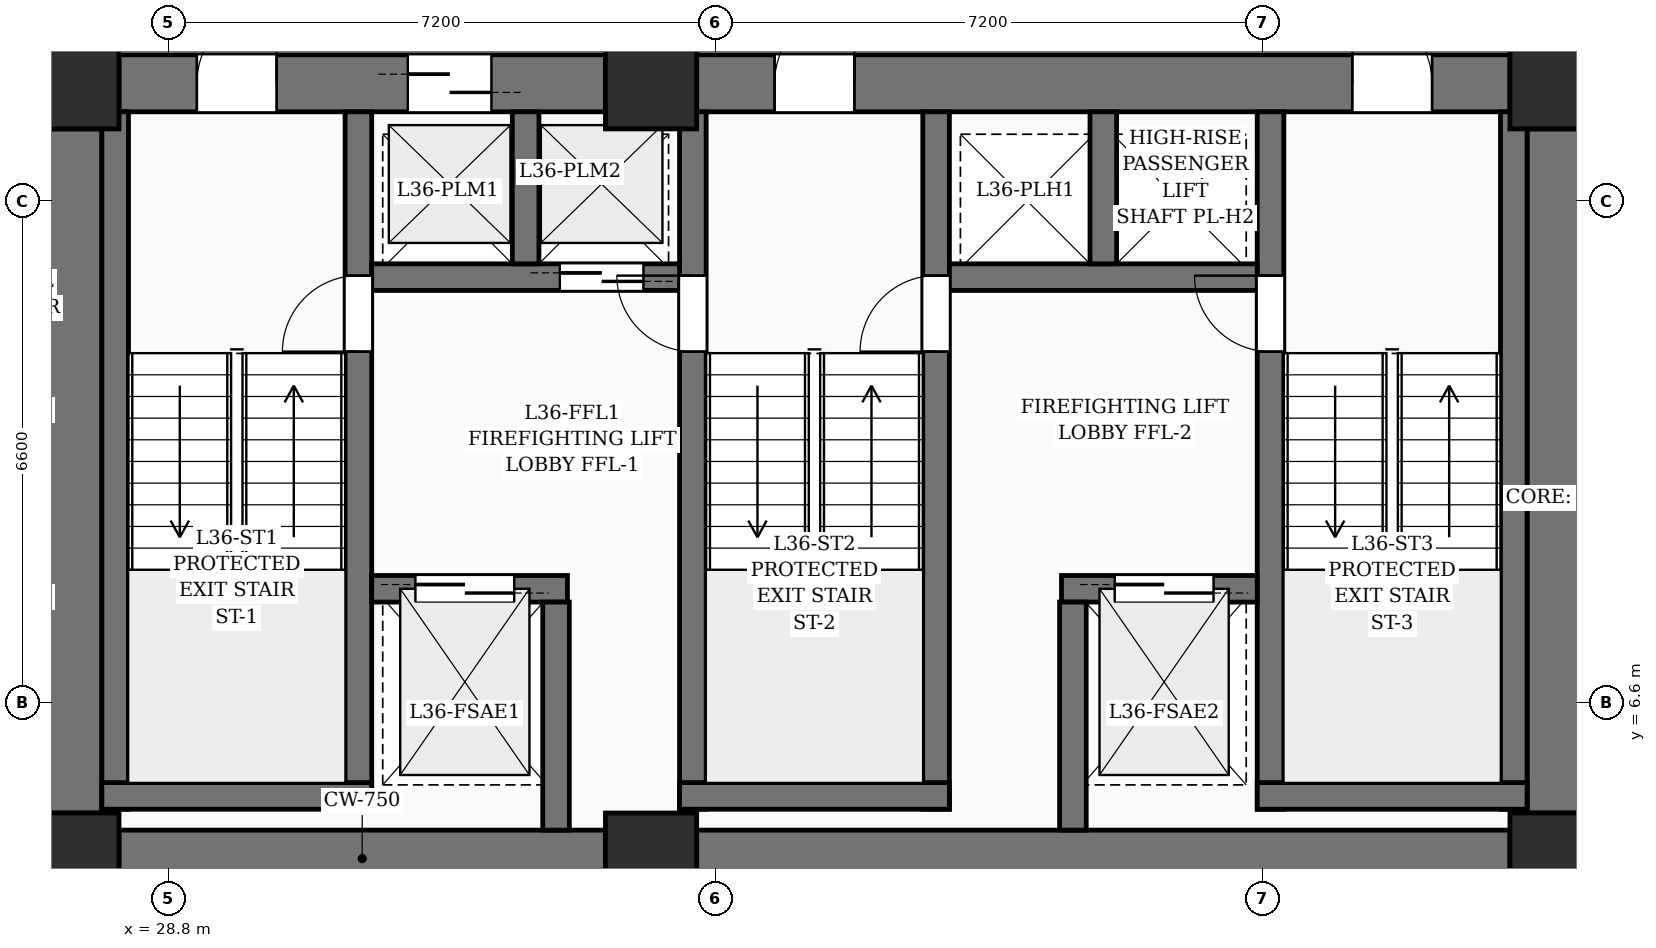
"""IFC4 building model, lengths in metres.
Left out: names, types, materials, properties, quantities, classifications, styles, units other than length and angle.
Written with IfcOpenShell. Run it as: python <this file> out.ifc"""

import sys

from ifc_helpers import new_model, si_unit, direction, frame, frame_2d, origin, origin_2d, place, context, subcontext, project, spatial, rectangle, extrude, element, fill, save


model = new_model("IFC4")
c1 = context("Model", 3, precision=1e-05, world=origin(), true_north=direction((0.0, 1.0)))
c2 = subcontext(c1, "Body", "Model", "MODEL_VIEW")
j1 = project(units=[si_unit("LENGTHUNIT", "METRE"), si_unit("PLANEANGLEUNIT", "RADIAN")], contexts=[c1])
p1 = place(None, origin())
s1 = spatial("IfcSite", under=j1, at=p1, CompositionType="ELEMENT")
p2 = place(p1, origin())
s2 = spatial("IfcBuilding", under=s1, at=p2, CompositionType="ELEMENT")
p3 = place(p2, frame((0.0, 0.0, 142.8)))
s3 = spatial("IfcBuildingStorey", under=s2, at=p3, CompositionType="ELEMENT", Elevation=142.8)
for number, where, z_axis, x_axis in (
    (1, (27.55, 4.55, 0.0), (0.0, 0.0, 1.0), (1.0, 0.0, 0.0)),
    (2, (35.15, 4.55, 0.0), (0.0, 0.0, 1.0), (1.0, 0.0, 0.0)),
    (3, (47.05, 4.55, 0.0), (0.0, 0.0, 1.0), (1.0, 0.0, 0.0)),
    (4, (27.55, 14.75, 0.0), (0.0, 0.0, 1.0), (1.0, 0.0, 0.0)),
    (5, (35.15, 14.75, 0.0), (0.0, 0.0, 1.0), (1.0, 0.0, 0.0)),
    (6, (47.05, 14.75, 0.0), (0.0, 0.0, 1.0), (1.0, 0.0, 0.0)),
):
    element("IfcColumn", number, at=place(p3, frame(where, z_axis=z_axis, x_axis=x_axis)), inside=s3, PredefinedType="COLUMN", context=c2, shape_type="SweptSolid", body=[
        extrude(rectangle(XDim=1.2, YDim=1.2, at=origin_2d()), origin(), (0.0, 0.0, 1.0), 3.6),
    ])
p4 = place(p3, frame((28.15, 4.55, 0.0), z_axis=(0.0, 0.0, 1.0), x_axis=(1.0, 0.0, 0.0)))
e7 = element("IfcWall", 7, at=p4, inside=s3, PredefinedType="SHEAR", context=c2, shape_type="SweptSolid", body=[
    extrude(rectangle(XDim=6.4, YDim=0.75, at=frame_2d((3.2, 0.0))), origin(), (0.0, 0.0, 1.0), 3.6),
])
p5 = place(p3, frame((35.75, 4.55, 0.0), z_axis=(0.0, 0.0, 1.0), x_axis=(1.0, 0.0, 0.0)))
e8 = element("IfcWall", 8, at=p5, inside=s3, PredefinedType="SHEAR", context=c2, shape_type="SweptSolid", body=[
    extrude(rectangle(XDim=10.7, YDim=0.75, at=frame_2d((5.35, 0.0))), origin(), (0.0, 0.0, 1.0), 3.6),
])
p6 = place(p3, frame((28.15, 14.75, 0.0), z_axis=(0.0, 0.0, 1.0), x_axis=(1.0, 0.0, 0.0)))
e9 = element("IfcWall", 9, at=p6, inside=s3, PredefinedType="SHEAR", context=c2, shape_type="SweptSolid", body=[
    extrude(rectangle(XDim=6.4, YDim=0.75, at=frame_2d((3.2, 0.0))), origin(), (0.0, 0.0, 1.0), 3.6),
])
p7 = place(p6, frame((1.025, 0.0, 0.0)))
e10 = element("IfcOpeningElement", 10, at=p7, cuts=e9, PredefinedType="OPENING", context=c2, shape_type="SweptSolid", body=[
    extrude(rectangle(XDim=1.05, YDim=2.15, at=frame_2d((0.525, 1.075))), frame((0.0, 0.385, 0.0), z_axis=(0.0, -1.0, 0.0), x_axis=(1.0, 0.0, 0.0)), (0.0, 0.0, 1.0), 0.77),
])
p8 = place(p6, frame((3.8, 0.0, 0.0)))
e11 = element("IfcOpeningElement", 11, at=p8, cuts=e9, PredefinedType="OPENING", context=c2, shape_type="SweptSolid", body=[
    extrude(rectangle(XDim=1.1, YDim=2.2, at=frame_2d((0.55, 1.1))), frame((0.0, 0.385, 0.0), z_axis=(0.0, -1.0, 0.0), x_axis=(1.0, 0.0, 0.0)), (0.0, 0.0, 1.0), 0.77),
])
p9 = place(p3, frame((35.75, 14.75, 0.0), z_axis=(0.0, 0.0, 1.0), x_axis=(1.0, 0.0, 0.0)))
e12 = element("IfcWall", 12, at=p9, inside=s3, PredefinedType="SHEAR", context=c2, shape_type="SweptSolid", body=[
    extrude(rectangle(XDim=10.7, YDim=0.75, at=frame_2d((5.35, 0.0))), origin(), (0.0, 0.0, 1.0), 3.6),
])
p10 = place(p9, frame((1.025, 0.0, 0.0)))
e13 = element("IfcOpeningElement", 13, at=p10, cuts=e12, PredefinedType="OPENING", context=c2, shape_type="SweptSolid", body=[
    extrude(rectangle(XDim=1.05, YDim=2.15, at=frame_2d((0.525, 1.075))), frame((0.0, 0.385, 0.0), z_axis=(0.0, -1.0, 0.0), x_axis=(1.0, 0.0, 0.0)), (0.0, 0.0, 1.0), 0.77),
])
p11 = place(p9, frame((8.625, 0.0, 0.0)))
e14 = element("IfcOpeningElement", 14, at=p11, cuts=e12, PredefinedType="OPENING", context=c2, shape_type="SweptSolid", body=[
    extrude(rectangle(XDim=1.05, YDim=2.15, at=frame_2d((0.525, 1.075))), frame((0.0, 0.385, 0.0), z_axis=(0.0, -1.0, 0.0), x_axis=(1.0, 0.0, 0.0)), (0.0, 0.0, 1.0), 0.77),
])
for number, where, z_axis, x_axis in (
    (15, (27.55, 5.15, 0.0), (0.0, 0.0, 1.0), (0.0, 1.0, 0.0)),
    (16, (47.05, 5.15, 0.0), (0.0, 0.0, 1.0), (0.0, 1.0, 0.0)),
):
    element("IfcWall", number, at=place(p3, frame(where, z_axis=z_axis, x_axis=x_axis)), inside=s3, PredefinedType="SHEAR", context=c2, shape_type="SweptSolid", body=[
        extrude(rectangle(XDim=9.0, YDim=0.75, at=frame_2d((4.5, 0.0))), origin(), (0.0, 0.0, 1.0), 3.6),
    ])
p12 = place(p3, frame((28.1, 5.2, 0.0), z_axis=(0.0, 0.0, 1.0), x_axis=(0.0, 1.0, 0.0)))
e17 = element("IfcWall", 17, at=p12, inside=s3, PredefinedType="SOLIDWALL", context=c2, shape_type="SweptSolid", body=[
    extrude(rectangle(XDim=9.175, YDim=0.35, at=frame_2d((4.587, 0.0))), origin(), (0.0, 0.0, 1.0), 3.6),
])
p13 = place(p3, frame((31.3, 5.2, 0.0), z_axis=(0.0, 0.0, 1.0), x_axis=(0.0, 1.0, 0.0)))
e18 = element("IfcWall", 18, at=p13, inside=s3, PredefinedType="SOLIDWALL", context=c2, shape_type="SweptSolid", body=[
    extrude(rectangle(XDim=9.175, YDim=0.35, at=frame_2d((4.587, 0.0))), origin(), (0.0, 0.0, 1.0), 3.6),
])
p14 = place(p13, frame((6.02, 0.0, 0.0)))
e19 = element("IfcOpeningElement", 19, at=p14, cuts=e18, PredefinedType="OPENING", context=c2, shape_type="SweptSolid", body=[
    extrude(rectangle(XDim=1.0, YDim=2.15, at=frame_2d((0.5, 1.075))), frame((0.0, 0.185, 0.0), z_axis=(0.0, -1.0, 0.0), x_axis=(1.0, 0.0, 0.0)), (0.0, 0.0, 1.0), 0.37),
])
p15 = place(p3, frame((27.925, 5.375, 0.0), z_axis=(0.0, 0.0, 1.0), x_axis=(1.0, 0.0, 0.0)))
e20 = element("IfcWall", 20, at=p15, inside=s3, PredefinedType="SOLIDWALL", context=c2, shape_type="SweptSolid", body=[
    extrude(rectangle(XDim=3.55, YDim=0.35, at=frame_2d((1.775, 0.0))), origin(), (0.0, 0.0, 1.0), 3.6),
])
p16 = place(p3, frame((35.7, 5.2, 0.0), z_axis=(0.0, 0.0, 1.0), x_axis=(0.0, 1.0, 0.0)))
e21 = element("IfcWall", 21, at=p16, inside=s3, PredefinedType="SOLIDWALL", context=c2, shape_type="SweptSolid", body=[
    extrude(rectangle(XDim=9.175, YDim=0.35, at=frame_2d((4.587, 0.0))), origin(), (0.0, 0.0, 1.0), 3.6),
])
p17 = place(p16, frame((6.02, 0.0, 0.0)))
e22 = element("IfcOpeningElement", 22, at=p17, cuts=e21, PredefinedType="OPENING", context=c2, shape_type="SweptSolid", body=[
    extrude(rectangle(XDim=1.0, YDim=2.15, at=frame_2d((0.5, 1.075))), frame((0.0, 0.185, 0.0), z_axis=(0.0, -1.0, 0.0), x_axis=(1.0, 0.0, 0.0)), (0.0, 0.0, 1.0), 0.37),
])
p18 = place(p3, frame((38.9, 5.2, 0.0), z_axis=(0.0, 0.0, 1.0), x_axis=(0.0, 1.0, 0.0)))
e23 = element("IfcWall", 23, at=p18, inside=s3, PredefinedType="SOLIDWALL", context=c2, shape_type="SweptSolid", body=[
    extrude(rectangle(XDim=9.175, YDim=0.35, at=frame_2d((4.587, 0.0))), origin(), (0.0, 0.0, 1.0), 3.6),
])
p19 = place(p18, frame((6.02, 0.0, 0.0)))
e24 = element("IfcOpeningElement", 24, at=p19, cuts=e23, PredefinedType="OPENING", context=c2, shape_type="SweptSolid", body=[
    extrude(rectangle(XDim=1.0, YDim=2.15, at=frame_2d((0.5, 1.075))), frame((0.0, 0.185, 0.0), z_axis=(0.0, -1.0, 0.0), x_axis=(1.0, 0.0, 0.0)), (0.0, 0.0, 1.0), 0.37),
])
p20 = place(p3, frame((35.525, 5.375, 0.0), z_axis=(0.0, 0.0, 1.0), x_axis=(1.0, 0.0, 0.0)))
e25 = element("IfcWall", 25, at=p20, inside=s3, PredefinedType="SOLIDWALL", context=c2, shape_type="SweptSolid", body=[
    extrude(rectangle(XDim=3.55, YDim=0.35, at=frame_2d((1.775, 0.0))), origin(), (0.0, 0.0, 1.0), 3.6),
])
p21 = place(p3, frame((43.3, 5.2, 0.0), z_axis=(0.0, 0.0, 1.0), x_axis=(0.0, 1.0, 0.0)))
e26 = element("IfcWall", 26, at=p21, inside=s3, PredefinedType="SOLIDWALL", context=c2, shape_type="SweptSolid", body=[
    extrude(rectangle(XDim=9.175, YDim=0.35, at=frame_2d((4.587, 0.0))), origin(), (0.0, 0.0, 1.0), 3.6),
])
p22 = place(p21, frame((6.02, 0.0, 0.0)))
e27 = element("IfcOpeningElement", 27, at=p22, cuts=e26, PredefinedType="OPENING", context=c2, shape_type="SweptSolid", body=[
    extrude(rectangle(XDim=1.0, YDim=2.15, at=frame_2d((0.5, 1.075))), frame((0.0, 0.185, 0.0), z_axis=(0.0, -1.0, 0.0), x_axis=(1.0, 0.0, 0.0)), (0.0, 0.0, 1.0), 0.37),
])
p23 = place(p3, frame((46.5, 5.2, 0.0), z_axis=(0.0, 0.0, 1.0), x_axis=(0.0, 1.0, 0.0)))
e28 = element("IfcWall", 28, at=p23, inside=s3, PredefinedType="SOLIDWALL", context=c2, shape_type="SweptSolid", body=[
    extrude(rectangle(XDim=9.175, YDim=0.35, at=frame_2d((4.587, 0.0))), origin(), (0.0, 0.0, 1.0), 3.6),
])
p24 = place(p3, frame((43.125, 5.375, 0.0), z_axis=(0.0, 0.0, 1.0), x_axis=(1.0, 0.0, 0.0)))
e29 = element("IfcWall", 29, at=p24, inside=s3, PredefinedType="SOLIDWALL", context=c2, shape_type="SweptSolid", body=[
    extrude(rectangle(XDim=3.55, YDim=0.35, at=frame_2d((1.775, 0.0))), origin(), (0.0, 0.0, 1.0), 3.6),
])
p25 = place(p3, frame((31.475, 8.1, 0.0), z_axis=(0.0, 0.0, 1.0), x_axis=(1.0, 0.0, 0.0)))
e30 = element("IfcWall", 30, at=p25, inside=s3, PredefinedType="SOLIDWALL", context=c2, shape_type="SweptSolid", body=[
    extrude(rectangle(XDim=2.575, YDim=0.35, at=frame_2d((1.288, 0.0))), origin(), (0.0, 0.0, 1.0), 3.6),
])
p26 = place(p25, frame((0.575, 0.0, 0.0)))
e31 = element("IfcOpeningElement", 31, at=p26, cuts=e30, PredefinedType="OPENING", context=c2, shape_type="SweptSolid", body=[
    extrude(rectangle(XDim=1.3, YDim=2.25, at=frame_2d((0.65, 1.125))), frame((0.0, 0.185, 0.0), z_axis=(0.0, -1.0, 0.0), x_axis=(1.0, 0.0, 0.0)), (0.0, 0.0, 1.0), 0.37),
])
p27 = place(p3, frame((40.55, 8.1, 0.0), z_axis=(0.0, 0.0, 1.0), x_axis=(1.0, 0.0, 0.0)))
e32 = element("IfcWall", 32, at=p27, inside=s3, PredefinedType="SOLIDWALL", context=c2, shape_type="SweptSolid", body=[
    extrude(rectangle(XDim=2.575, YDim=0.35, at=frame_2d((1.288, 0.0))), origin(), (0.0, 0.0, 1.0), 3.6),
])
p28 = place(p27, frame((0.7, 0.0, 0.0)))
e33 = element("IfcOpeningElement", 33, at=p28, cuts=e32, PredefinedType="OPENING", context=c2, shape_type="SweptSolid", body=[
    extrude(rectangle(XDim=1.3, YDim=2.25, at=frame_2d((0.65, 1.125))), frame((0.0, 0.185, 0.0), z_axis=(0.0, -1.0, 0.0), x_axis=(1.0, 0.0, 0.0)), (0.0, 0.0, 1.0), 0.37),
])
for number, where, z_axis, x_axis in (
    (34, (33.9, 4.925, 0.0), (0.0, 0.0, 1.0), (0.0, 1.0, 0.0)),
    (35, (40.7, 4.925, 0.0), (0.0, 0.0, 1.0), (0.0, 1.0, 0.0)),
):
    element("IfcWall", number, at=place(p3, frame(where, z_axis=z_axis, x_axis=x_axis)), inside=s3, PredefinedType="SOLIDWALL", context=c2, shape_type="SweptSolid", body=[
        extrude(rectangle(XDim=3.0, YDim=0.35, at=frame_2d((1.5, 0.0))), origin(), (0.0, 0.0, 1.0), 3.6),
    ])
p29 = place(p3, frame((31.475, 12.2, 0.0), z_axis=(0.0, 0.0, 1.0), x_axis=(1.0, 0.0, 0.0)))
e36 = element("IfcWall", 36, at=p29, inside=s3, PredefinedType="SOLIDWALL", context=c2, shape_type="SweptSolid", body=[
    extrude(rectangle(XDim=4.05, YDim=0.35, at=frame_2d((2.025, 0.0))), origin(), (0.0, 0.0, 1.0), 3.6),
])
p30 = place(p29, frame((2.475, 0.0, 0.0)))
e37 = element("IfcOpeningElement", 37, at=p30, cuts=e36, PredefinedType="OPENING", context=c2, shape_type="SweptSolid", body=[
    extrude(rectangle(XDim=1.1, YDim=2.2, at=frame_2d((0.55, 1.1))), frame((0.0, 0.185, 0.0), z_axis=(0.0, -1.0, 0.0), x_axis=(1.0, 0.0, 0.0)), (0.0, 0.0, 1.0), 0.37),
])
p31 = place(p3, frame((33.5, 12.375, 0.0), z_axis=(0.0, 0.0, 1.0), x_axis=(0.0, 1.0, 0.0)))
e38 = element("IfcWall", 38, at=p31, inside=s3, PredefinedType="SOLIDWALL", context=c2, shape_type="SweptSolid", body=[
    extrude(rectangle(XDim=2.0, YDim=0.35, at=frame_2d((1.0, 0.0))), origin(), (0.0, 0.0, 1.0), 3.6),
])
p32 = place(p3, frame((39.075, 12.2, 0.0), z_axis=(0.0, 0.0, 1.0), x_axis=(1.0, 0.0, 0.0)))
e39 = element("IfcWall", 39, at=p32, inside=s3, PredefinedType="SOLIDWALL", context=c2, shape_type="SweptSolid", body=[
    extrude(rectangle(XDim=4.05, YDim=0.35, at=frame_2d((2.025, 0.0))), origin(), (0.0, 0.0, 1.0), 3.6),
])
p33 = place(p3, frame((41.1, 12.375, 0.0), z_axis=(0.0, 0.0, 1.0), x_axis=(0.0, 1.0, 0.0)))
e40 = element("IfcWall", 40, at=p33, inside=s3, PredefinedType="SOLIDWALL", context=c2, shape_type="SweptSolid", body=[
    extrude(rectangle(XDim=2.0, YDim=0.35, at=frame_2d((1.0, 0.0))), origin(), (0.0, 0.0, 1.0), 3.6),
])
p34 = place(p7, origin())
e41 = element("IfcDoor", 41, at=p34, inside=s3, OperationType="SINGLE_SWING_RIGHT", PredefinedType="DOOR", context=c2, shape_type="SweptSolid", body=[
    extrude(rectangle(XDim=1.05, YDim=2.15, at=frame_2d((0.525, 1.075))), frame((0.0, 0.025, 0.0), z_axis=(0.0, -1.0, 0.0), x_axis=(1.0, 0.0, 0.0)), (0.0, 0.0, 1.0), 0.05),
])
fill(e10, e41)
p35 = place(p10, origin())
e42 = element("IfcDoor", 42, at=p35, inside=s3, OperationType="SINGLE_SWING_RIGHT", PredefinedType="DOOR", context=c2, shape_type="SweptSolid", body=[
    extrude(rectangle(XDim=1.05, YDim=2.15, at=frame_2d((0.525, 1.075))), frame((0.0, 0.025, 0.0), z_axis=(0.0, -1.0, 0.0), x_axis=(1.0, 0.0, 0.0)), (0.0, 0.0, 1.0), 0.05),
])
fill(e13, e42)
p36 = place(p11, origin())
e43 = element("IfcDoor", 43, at=p36, inside=s3, OperationType="SINGLE_SWING_LEFT", PredefinedType="DOOR", context=c2, shape_type="SweptSolid", body=[
    extrude(rectangle(XDim=1.05, YDim=2.15, at=frame_2d((0.525, 1.075))), frame((0.0, 0.025, 0.0), z_axis=(0.0, -1.0, 0.0), x_axis=(1.0, 0.0, 0.0)), (0.0, 0.0, 1.0), 0.05),
])
fill(e14, e43)
p37 = place(p14, origin())
e44 = element("IfcDoor", 44, at=p37, inside=s3, OperationType="SINGLE_SWING_LEFT", PredefinedType="DOOR", context=c2, shape_type="SweptSolid", body=[
    extrude(rectangle(XDim=1.0, YDim=2.15, at=frame_2d((0.5, 1.075))), frame((0.0, 0.025, 0.0), z_axis=(0.0, -1.0, 0.0), x_axis=(1.0, 0.0, 0.0)), (0.0, 0.0, 1.0), 0.05),
])
fill(e19, e44)
p38 = place(p17, origin())
e45 = element("IfcDoor", 45, at=p38, inside=s3, OperationType="SINGLE_SWING_RIGHT", PredefinedType="DOOR", context=c2, shape_type="SweptSolid", body=[
    extrude(rectangle(XDim=1.0, YDim=2.15, at=frame_2d((0.5, 1.075))), frame((0.0, 0.025, 0.0), z_axis=(0.0, -1.0, 0.0), x_axis=(1.0, 0.0, 0.0)), (0.0, 0.0, 1.0), 0.05),
])
fill(e22, e45)
p39 = place(p19, origin())
e46 = element("IfcDoor", 46, at=p39, inside=s3, OperationType="SINGLE_SWING_LEFT", PredefinedType="DOOR", context=c2, shape_type="SweptSolid", body=[
    extrude(rectangle(XDim=1.0, YDim=2.15, at=frame_2d((0.5, 1.075))), frame((0.0, 0.025, 0.0), z_axis=(0.0, -1.0, 0.0), x_axis=(1.0, 0.0, 0.0)), (0.0, 0.0, 1.0), 0.05),
])
fill(e24, e46)
p40 = place(p22, origin())
e47 = element("IfcDoor", 47, at=p40, inside=s3, OperationType="SINGLE_SWING_RIGHT", PredefinedType="DOOR", context=c2, shape_type="SweptSolid", body=[
    extrude(rectangle(XDim=1.0, YDim=2.15, at=frame_2d((0.5, 1.075))), frame((0.0, 0.025, 0.0), z_axis=(0.0, -1.0, 0.0), x_axis=(1.0, 0.0, 0.0)), (0.0, 0.0, 1.0), 0.05),
])
fill(e27, e47)
p41 = place(p26, origin())
e48 = element("IfcDoor", 48, at=p41, inside=s3, OperationType="DOUBLE_DOOR_SLIDING", PredefinedType="DOOR", context=c2, shape_type="SweptSolid", body=[
    extrude(rectangle(XDim=1.3, YDim=2.25, at=frame_2d((0.65, 1.125))), frame((0.0, 0.025, 0.0), z_axis=(0.0, -1.0, 0.0), x_axis=(1.0, 0.0, 0.0)), (0.0, 0.0, 1.0), 0.05),
])
fill(e31, e48)
p42 = place(p28, origin())
e49 = element("IfcDoor", 49, at=p42, inside=s3, OperationType="DOUBLE_DOOR_SLIDING", PredefinedType="DOOR", context=c2, shape_type="SweptSolid", body=[
    extrude(rectangle(XDim=1.3, YDim=2.25, at=frame_2d((0.65, 1.125))), frame((0.0, 0.025, 0.0), z_axis=(0.0, -1.0, 0.0), x_axis=(1.0, 0.0, 0.0)), (0.0, 0.0, 1.0), 0.05),
])
fill(e33, e49)
p43 = place(p8, origin())
e50 = element("IfcDoor", 50, at=p43, inside=s3, OperationType="DOUBLE_DOOR_SLIDING", PredefinedType="DOOR", context=c2, shape_type="SweptSolid", body=[
    extrude(rectangle(XDim=1.1, YDim=2.2, at=frame_2d((0.55, 1.1))), frame((0.0, 0.025, 0.0), z_axis=(0.0, -1.0, 0.0), x_axis=(1.0, 0.0, 0.0)), (0.0, 0.0, 1.0), 0.05),
])
fill(e11, e50)
p44 = place(p30, origin())
e51 = element("IfcDoor", 51, at=p44, inside=s3, OperationType="DOUBLE_DOOR_SLIDING", PredefinedType="DOOR", context=c2, shape_type="SweptSolid", body=[
    extrude(rectangle(XDim=1.1, YDim=2.2, at=frame_2d((0.55, 1.1))), frame((0.0, 0.025, 0.0), z_axis=(0.0, -1.0, 0.0), x_axis=(1.0, 0.0, 0.0)), (0.0, 0.0, 1.0), 0.05),
])
fill(e37, e51)
save(model, sys.argv[1])
